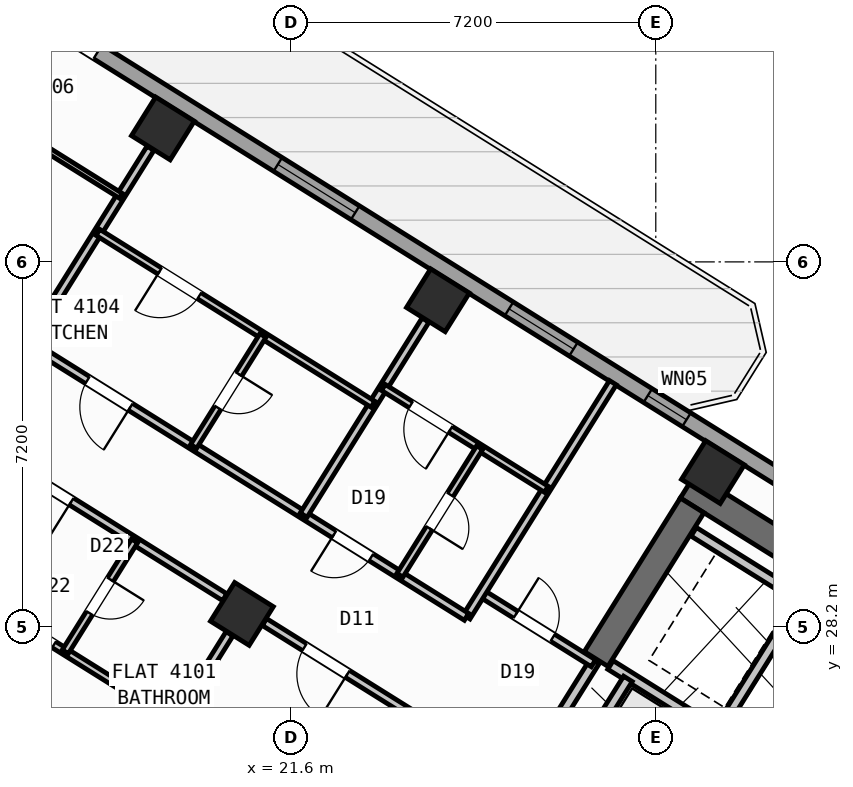
"""IFC4 building model, lengths in metres.
Left out: names, types, materials, properties, quantities, classifications, styles, units other than length and angle.
Written with IfcOpenShell. Run it as: python <this file> out.ifc"""

import sys

from ifc_helpers import new_model, si_unit, direction, frame, frame_2d, origin, origin_2d, place, context, subcontext, project, spatial, rectangle, hollow_rectangle, extrude, source, transform, mapped, element, fill, save


model = new_model("IFC4")
c1 = context("Model", 3, precision=1e-05, world=origin(), true_north=direction((0.0, 1.0)))
c2 = subcontext(c1, "Body", "Model", "MODEL_VIEW")
j1 = project(units=[si_unit("LENGTHUNIT", "METRE"), si_unit("PLANEANGLEUNIT", "RADIAN")], contexts=[c1])
p1 = place(None, origin())
s1 = spatial("IfcSite", under=j1, at=p1, CompositionType="ELEMENT")
p2 = place(p1, origin())
s2 = spatial("IfcBuilding", under=s1, at=p2, CompositionType="ELEMENT")
p3 = place(p2, frame((0.0, 0.0, 162.3)))
s3 = spatial("IfcBuildingStorey", under=s2, at=p3, CompositionType="ELEMENT", Elevation=162.3)
p4 = place(p3, frame((40.573, 24.01, 0.0), z_axis=(0.0, 0.0, 1.0), x_axis=(-0.848047359947, 0.529920442413, 0.0)))
e1 = element("IfcWall", 1, at=p4, inside=s3, PredefinedType="SHEAR", context=c2, shape_type="SweptSolid", body=[
    extrude(rectangle(XDim=13.14, YDim=0.55, at=frame_2d((6.57, 0.0))), origin(), (0.0, 0.0, 1.0), 3.35),
])
p5 = place(p3, frame((29.517, 30.594, 0.0), z_axis=(0.0, 0.0, 1.0), x_axis=(-0.529906864564, -0.848055844204, 0.0)))
e2 = element("IfcWall", 2, at=p5, inside=s3, PredefinedType="SHEAR", context=c2, shape_type="SweptSolid", body=[
    extrude(rectangle(XDim=3.575, YDim=0.55, at=frame_2d((1.788, 0.0))), origin(), (0.0, 0.0, 1.0), 3.35),
])
m1 = source(origin(), c2, "Body", "SweptSolid", [
    extrude(hollow_rectangle(XDim=0.9, YDim=0.9, WallThickness=0.036, at=origin_2d()), origin(), (0.0, 0.0, 1.0), 3.6),
])
for number, where, z_axis, x_axis in (
    (3, (29.928, 31.251, 0.0), (0.0, 0.0, 1.0), (-0.848, 0.53, 0.0)),
    (4, (24.5, 34.643, 0.0), (0.0, 0.0, 1.0), (-0.848, 0.53, 0.0)),
    (5, (20.632, 28.452, 0.0), (0.0, 0.0, 1.0), (-0.848, 0.53, 0.0)),
    (6, (19.073, 38.034, 0.0), (0.0, 0.0, 1.0), (-0.848, 0.53, 0.0)),
):
    element("IfcColumn", number, at=place(p3, frame(where, z_axis=z_axis, x_axis=x_axis)), inside=s3, PredefinedType="COLUMN", context=c2, shape_type="MappedRepresentation", body=[
        mapped(m1, transform((0.0, 0.0, 0.0), scale=1.0)),
    ])
p6 = place(p3, frame((14.138, 41.825, 0.0), z_axis=(0.0, 0.0, 1.0), x_axis=(0.848046498049, -0.529921821731, 0.0)))
e7 = element("IfcWall", 7, at=p6, inside=s3, PredefinedType="STANDARD", context=c2, shape_type="SweptSolid", body=[
    extrude(rectangle(XDim=31.588, YDim=0.32, at=frame_2d((15.794, 0.0))), origin(), (0.0, 0.0, 1.0), 3.35),
])
p7 = place(p6, frame((3.253, 0.0, 0.0)))
e8 = element("IfcOpeningElement", 8, at=p7, cuts=e7, PredefinedType="OPENING", context=c2, shape_type="SweptSolid", body=[
    extrude(rectangle(XDim=1.05, YDim=2.15, at=frame_2d((0.525, 1.075))), frame((0.0, 0.17, 0.0), z_axis=(0.0, -1.0, 0.0), x_axis=(1.0, 0.0, 0.0)), (0.0, 0.0, 1.0), 0.34),
])
p8 = place(p6, frame((0.863, 0.0, 0.85)))
e9 = element("IfcOpeningElement", 9, at=p8, cuts=e7, PredefinedType="OPENING", context=c2, shape_type="SweptSolid", body=[
    extrude(rectangle(XDim=1.8, YDim=1.5, at=frame_2d((0.9, 0.75))), frame((0.0, 0.17, 0.0), z_axis=(0.0, -1.0, 0.0), x_axis=(1.0, 0.0, 0.0)), (0.0, 0.0, 1.0), 0.34),
])
p9 = place(p6, frame((8.494, 0.0, 0.85)))
e10 = element("IfcOpeningElement", 10, at=p9, cuts=e7, PredefinedType="OPENING", context=c2, shape_type="SweptSolid", body=[
    extrude(rectangle(XDim=1.8, YDim=1.5, at=frame_2d((0.9, 0.75))), frame((0.0, 0.17, 0.0), z_axis=(0.0, -1.0, 0.0), x_axis=(1.0, 0.0, 0.0)), (0.0, 0.0, 1.0), 0.34),
])
p10 = place(p6, frame((13.874, 0.0, 0.85)))
e11 = element("IfcOpeningElement", 11, at=p10, cuts=e7, PredefinedType="OPENING", context=c2, shape_type="SweptSolid", body=[
    extrude(rectangle(XDim=1.5, YDim=1.5, at=frame_2d((0.75, 0.75))), frame((0.0, 0.17, 0.0), z_axis=(0.0, -1.0, 0.0), x_axis=(1.0, 0.0, 0.0)), (0.0, 0.0, 1.0), 0.34),
])
p11 = place(p6, frame((17.104, 0.0, 1.0)))
e12 = element("IfcOpeningElement", 12, at=p11, cuts=e7, PredefinedType="OPENING", context=c2, shape_type="SweptSolid", body=[
    extrude(rectangle(XDim=0.9, YDim=1.25, at=frame_2d((0.45, 0.625))), frame((0.0, 0.17, 0.0), z_axis=(0.0, -1.0, 0.0), x_axis=(1.0, 0.0, 0.0)), (0.0, 0.0, 1.0), 0.34),
])
p12 = place(p6, frame((22.144, 0.0, 1.0)))
e13 = element("IfcOpeningElement", 13, at=p12, cuts=e7, PredefinedType="OPENING", context=c2, shape_type="SweptSolid", body=[
    extrude(rectangle(XDim=0.9, YDim=1.25, at=frame_2d((0.45, 0.625))), frame((0.0, 0.17, 0.0), z_axis=(0.0, -1.0, 0.0), x_axis=(1.0, 0.0, 0.0)), (0.0, 0.0, 1.0), 0.34),
])
p13 = place(p6, frame((27.744, 0.0, 1.0)))
e14 = element("IfcOpeningElement", 14, at=p13, cuts=e7, PredefinedType="OPENING", context=c2, shape_type="SweptSolid", body=[
    extrude(rectangle(XDim=0.9, YDim=1.25, at=frame_2d((0.45, 0.625))), frame((0.0, 0.17, 0.0), z_axis=(0.0, -1.0, 0.0), x_axis=(1.0, 0.0, 0.0)), (0.0, 0.0, 1.0), 0.34),
])
p14 = place(p3, frame((31.822, 24.998, 0.0), z_axis=(0.0, 0.0, 1.0), x_axis=(-0.848036912365, 0.52993716162, 0.0)))
e15 = element("IfcWall", 15, at=p14, inside=s3, PredefinedType="STANDARD", context=c2, shape_type="SweptSolid", body=[
    extrude(rectangle(XDim=4.618, YDim=0.2, at=frame_2d((2.309, 0.0))), origin(), (0.0, 0.0, 1.0), 3.34),
])
p15 = place(p3, frame((28.25, 27.17, 0.0), z_axis=(0.0, 0.0, 1.0), x_axis=(-0.529905827651, -0.848056492117, 0.0)))
e16 = element("IfcWall", 16, at=p15, inside=s3, PredefinedType="STANDARD", context=c2, shape_type="SweptSolid", body=[
    extrude(rectangle(XDim=1.65, YDim=0.2, at=frame_2d((0.825, 0.0))), origin(), (0.0, 0.0, 1.0), 3.34),
])
p16 = place(p3, frame((31.645, 28.716, 0.0), z_axis=(0.0, 0.0, 1.0), x_axis=(-0.52986693015, -0.848080795876, 0.0)))
e17 = element("IfcWall", 17, at=p16, inside=s3, PredefinedType="STANDARD", context=c2, shape_type="SweptSolid", body=[
    extrude(rectangle(XDim=2.66, YDim=0.2, at=frame_2d((1.33, 0.0))), origin(), (0.0, 0.0, 1.0), 3.34),
])
p17 = place(p3, frame((33.363, 27.69, 0.0), z_axis=(0.0, 0.0, 1.0), x_axis=(-0.848047090064, 0.529920874315, 0.0)))
e18 = element("IfcWall", 18, at=p17, inside=s3, PredefinedType="STANDARD", context=c2, shape_type="SweptSolid", body=[
    extrude(rectangle(XDim=4.498, YDim=0.2, at=frame_2d((2.249, 0.0))), origin(), (0.0, 0.0, 1.0), 3.34),
])
p18 = place(p3, frame((27.596, 27.52, 0.0), z_axis=(0.0, 0.0, 1.0), x_axis=(-0.529865479138, -0.848081702443, 0.0)))
e19 = element("IfcWall", 19, at=p18, inside=s3, PredefinedType="STANDARD", context=c2, shape_type="SweptSolid", body=[
    extrude(rectangle(XDim=2.96, YDim=0.2, at=frame_2d((1.48, 0.0))), origin(), (0.0, 0.0, 1.0), 3.34),
])
p19 = place(p18, frame((1.76, 0.0, 0.0)))
e20 = element("IfcOpeningElement", 20, at=p19, cuts=e19, PredefinedType="OPENING", context=c2, shape_type="SweptSolid", body=[
    extrude(rectangle(XDim=0.86, YDim=2.05, at=frame_2d((0.43, 1.025))), frame((0.0, 0.11, 0.0), z_axis=(0.0, -1.0, 0.0), x_axis=(1.0, 0.0, 0.0)), (0.0, 0.0, 1.0), 0.22),
])
p20 = place(p3, frame((27.57, 27.478, 0.0), z_axis=(0.0, 0.0, 1.0), x_axis=(-0.848050851465, 0.529914854792, 0.0)))
e21 = element("IfcWall", 21, at=p20, inside=s3, PredefinedType="PARTITIONING", context=c2, shape_type="SweptSolid", body=[
    extrude(rectangle(XDim=2.61, YDim=0.16, at=frame_2d((1.305, 0.0))), origin(), (0.0, 0.0, 1.0), 3.34),
])
p21 = place(p20, frame((0.95, 0.0, 0.0)))
e22 = element("IfcOpeningElement", 22, at=p21, cuts=e21, PredefinedType="OPENING", context=c2, shape_type="SweptSolid", body=[
    extrude(rectangle(XDim=0.86, YDim=2.05, at=frame_2d((0.43, 1.025))), frame((0.0, 0.09, 0.0), z_axis=(0.0, -1.0, 0.0), x_axis=(1.0, 0.0, 0.0)), (0.0, 0.0, 1.0), 0.18),
])
p22 = place(p3, frame((27.953, 33.016, 0.0), z_axis=(0.0, 0.0, 1.0), x_axis=(-0.529906322364, -0.848056182997, 0.0)))
e23 = element("IfcWall", 23, at=p22, inside=s3, PredefinedType="PARTITIONING", context=c2, shape_type="SweptSolid", body=[
    extrude(rectangle(XDim=5.45, YDim=0.16, at=frame_2d((2.725, 0.0))), origin(), (0.0, 0.0, 1.0), 3.34),
])
p23 = place(p3, frame((25.065, 28.394, 0.0), z_axis=(0.0, 0.0, 1.0), x_axis=(-0.848048310262, 0.529918921593, 0.0)))
e24 = element("IfcWall", 24, at=p23, inside=s3, PredefinedType="PARTITIONING", context=c2, shape_type="SweptSolid", body=[
    extrude(rectangle(XDim=16.73, YDim=0.16, at=frame_2d((8.365, 0.0))), origin(), (0.0, 0.0, 1.0), 3.34),
])
p24 = place(p23, frame((2.22, 0.0, 0.0)))
e25 = element("IfcOpeningElement", 25, at=p24, cuts=e24, PredefinedType="OPENING", context=c2, shape_type="SweptSolid", body=[
    extrude(rectangle(XDim=0.86, YDim=2.05, at=frame_2d((0.43, 1.025))), frame((0.0, 0.09, 0.0), z_axis=(0.0, -1.0, 0.0), x_axis=(1.0, 0.0, 0.0)), (0.0, 0.0, 1.0), 0.18),
])
p25 = place(p23, frame((7.82, 0.0, 0.0)))
e26 = element("IfcOpeningElement", 26, at=p25, cuts=e24, PredefinedType="OPENING", context=c2, shape_type="SweptSolid", body=[
    extrude(rectangle(XDim=1.0, YDim=2.1, at=frame_2d((0.5, 1.05))), frame((0.0, 0.09, 0.0), z_axis=(0.0, -1.0, 0.0), x_axis=(1.0, 0.0, 0.0)), (0.0, 0.0, 1.0), 0.18),
])
p26 = place(p23, frame((12.95, 0.0, 0.0)))
e27 = element("IfcOpeningElement", 27, at=p26, cuts=e24, PredefinedType="OPENING", context=c2, shape_type="SweptSolid", body=[
    extrude(rectangle(XDim=1.0, YDim=2.1, at=frame_2d((0.5, 1.05))), frame((0.0, 0.09, 0.0), z_axis=(0.0, -1.0, 0.0), x_axis=(1.0, 0.0, 0.0)), (0.0, 0.0, 1.0), 0.18),
])
p27 = place(p3, frame((23.899, 26.529, 0.0), z_axis=(0.0, 0.0, 1.0), x_axis=(-0.848064240775, 0.529893426567, 0.0)))
e28 = element("IfcWall", 28, at=p27, inside=s3, PredefinedType="PARTITIONING", context=c2, shape_type="SweptSolid", body=[
    extrude(rectangle(XDim=3.328, YDim=0.16, at=frame_2d((1.664, 0.0))), origin(), (0.0, 0.0, 1.0), 2.775),
])
p28 = place(p27, frame((1.395, 0.0, 0.0)))
e29 = element("IfcOpeningElement", 29, at=p28, cuts=e28, PredefinedType="OPENING", context=c2, shape_type="SweptSolid", body=[
    extrude(rectangle(XDim=1.0, YDim=2.1, at=frame_2d((0.5, 1.05))), frame((0.0, 0.09, 0.0), z_axis=(0.0, -1.0, 0.0), x_axis=(1.0, 0.0, 0.0)), (0.0, 0.0, 1.0), 0.18),
])
p29 = place(p3, frame((20.293, 28.782, 0.0), z_axis=(0.0, 0.0, 1.0), x_axis=(-0.848040881926, 0.529930809241, 0.0)))
e30 = element("IfcWall", 30, at=p29, inside=s3, PredefinedType="PARTITIONING", context=c2, shape_type="SweptSolid", body=[
    extrude(rectangle(XDim=5.476, YDim=0.16, at=frame_2d((2.738, 0.0))), origin(), (0.0, 0.0, 1.0), 2.775),
])
p30 = place(p29, frame((3.568, 0.0, 0.0)))
e31 = element("IfcOpeningElement", 31, at=p30, cuts=e30, PredefinedType="OPENING", context=c2, shape_type="SweptSolid", body=[
    extrude(rectangle(XDim=1.0, YDim=2.1, at=frame_2d((0.5, 1.05))), frame((0.0, 0.09, 0.0), z_axis=(0.0, -1.0, 0.0), x_axis=(1.0, 0.0, 0.0)), (0.0, 0.0, 1.0), 0.18),
])
p31 = place(p3, frame((20.387, 28.06, 0.0), z_axis=(0.0, 0.0, 1.0), x_axis=(-0.529902564924, -0.848058530814, 0.0)))
e32 = element("IfcWall", 32, at=p31, inside=s3, PredefinedType="PARTITIONING", context=c2, shape_type="SweptSolid", body=[
    extrude(rectangle(XDim=6.376, YDim=0.16, at=frame_2d((3.188, 0.0))), origin(), (0.0, 0.0, 1.0), 2.775),
])
p32 = place(p3, frame((19.318, 26.349, 0.0), z_axis=(0.0, 0.0, 1.0), x_axis=(-0.848039019877, 0.529933789039, 0.0)))
e33 = element("IfcWall", 33, at=p32, inside=s3, PredefinedType="PLUMBINGWALL", context=c2, shape_type="SweptSolid", body=[
    extrude(rectangle(XDim=6.4, YDim=0.14, at=frame_2d((3.2, 0.0))), origin(), (0.0, 0.0, 1.0), 3.34),
])
p33 = place(p32, frame((2.824, 0.0, 0.0)))
e34 = element("IfcOpeningElement", 34, at=p33, cuts=e33, PredefinedType="OPENING", context=c2, shape_type="SweptSolid", body=[
    extrude(rectangle(XDim=0.78, YDim=2.05, at=frame_2d((0.39, 1.025))), frame((0.0, 0.08, 0.0), z_axis=(0.0, -1.0, 0.0), x_axis=(1.0, 0.0, 0.0)), (0.0, 0.0, 1.0), 0.16),
])
p34 = place(p3, frame((18.514, 29.894, 0.0), z_axis=(0.0, 0.0, 1.0), x_axis=(-0.529913878929, -0.848051461244, 0.0)))
e35 = element("IfcWall", 35, at=p34, inside=s3, PredefinedType="PLUMBINGWALL", context=c2, shape_type="SweptSolid", body=[
    extrude(rectangle(XDim=2.58, YDim=0.14, at=frame_2d((1.29, 0.0))), origin(), (0.0, 0.0, 1.0), 3.34),
])
p35 = place(p34, frame((0.9, 0.0, 0.0)))
e36 = element("IfcOpeningElement", 36, at=p35, cuts=e35, PredefinedType="OPENING", context=c2, shape_type="SweptSolid", body=[
    extrude(rectangle(XDim=0.78, YDim=2.05, at=frame_2d((0.39, 1.025))), frame((0.0, 0.08, 0.0), z_axis=(0.0, -1.0, 0.0), x_axis=(1.0, 0.0, 0.0)), (0.0, 0.0, 1.0), 0.16),
])
p36 = place(p3, frame((24.256, 34.251, 0.0), z_axis=(0.0, 0.0, 1.0), x_axis=(-0.529926399231, -0.848043637673, 0.0)))
e37 = element("IfcWall", 37, at=p36, inside=s3, PredefinedType="PARTITIONING", context=c2, shape_type="SweptSolid", body=[
    extrude(rectangle(XDim=4.538, YDim=0.16, at=frame_2d((2.269, 0.0))), origin(), (0.0, 0.0, 1.0), 2.775),
])
p37 = place(p3, frame((26.639, 30.913, 0.0), z_axis=(0.0, 0.0, 1.0), x_axis=(-0.84803087207, 0.529946827537, 0.0)))
e38 = element("IfcWall", 38, at=p37, inside=s3, PredefinedType="PLUMBINGWALL", context=c2, shape_type="SweptSolid", body=[
    extrude(rectangle(XDim=3.79, YDim=0.14, at=frame_2d((1.895, 0.0))), origin(), (0.0, 0.0, 1.0), 3.34),
])
p38 = place(p37, frame((2.23, 0.0, 0.0)))
e39 = element("IfcOpeningElement", 39, at=p38, cuts=e38, PredefinedType="OPENING", context=c2, shape_type="SweptSolid", body=[
    extrude(rectangle(XDim=0.92, YDim=2.08, at=frame_2d((0.46, 1.04))), frame((0.0, 0.08, 0.0), z_axis=(0.0, -1.0, 0.0), x_axis=(1.0, 0.0, 0.0)), (0.0, 0.0, 1.0), 0.16),
])
p39 = place(p3, frame((25.324, 31.734, 0.0), z_axis=(0.0, 0.0, 1.0), x_axis=(-0.529873322326, -0.848076802116, 0.0)))
e40 = element("IfcWall", 40, at=p39, inside=s3, PredefinedType="PLUMBINGWALL", context=c2, shape_type="SweptSolid", body=[
    extrude(rectangle(XDim=2.97, YDim=0.14, at=frame_2d((1.485, 0.0))), origin(), (0.0, 0.0, 1.0), 2.995),
])
p40 = place(p39, frame((1.095, 0.0, 0.0)))
e41 = element("IfcOpeningElement", 41, at=p40, cuts=e40, PredefinedType="OPENING", context=c2, shape_type="SweptSolid", body=[
    extrude(rectangle(XDim=0.78, YDim=2.05, at=frame_2d((0.39, 1.025))), frame((0.0, 0.08, 0.0), z_axis=(0.0, -1.0, 0.0), x_axis=(1.0, 0.0, 0.0)), (0.0, 0.0, 1.0), 0.16),
])
p41 = place(p3, frame((18.828, 37.643, 0.0), z_axis=(0.0, 0.0, 1.0), x_axis=(-0.529926399231, -0.848043637673, 0.0)))
e42 = element("IfcWall", 42, at=p41, inside=s3, PredefinedType="PARTITIONING", context=c2, shape_type="SweptSolid", body=[
    extrude(rectangle(XDim=4.538, YDim=0.16, at=frame_2d((2.269, 0.0))), origin(), (0.0, 0.0, 1.0), 2.775),
])
p42 = place(p3, frame((23.218, 32.591, 0.0), z_axis=(0.0, 0.0, 1.0), x_axis=(-0.848056163074, 0.529906354247, 0.0)))
e43 = element("IfcWall", 43, at=p42, inside=s3, PredefinedType="PLUMBINGWALL", context=c2, shape_type="SweptSolid", body=[
    extrude(rectangle(XDim=6.4, YDim=0.14, at=frame_2d((3.2, 0.0))), origin(), (0.0, 0.0, 1.0), 3.34),
])
p43 = place(p42, frame((4.04, 0.0, 0.0)))
e44 = element("IfcOpeningElement", 44, at=p43, cuts=e43, PredefinedType="OPENING", context=c2, shape_type="SweptSolid", body=[
    extrude(rectangle(XDim=0.92, YDim=2.08, at=frame_2d((0.46, 1.04))), frame((0.0, 0.08, 0.0), z_axis=(0.0, -1.0, 0.0), x_axis=(1.0, 0.0, 0.0)), (0.0, 0.0, 1.0), 0.16),
])
p44 = place(p3, frame((21.047, 33.947, 0.0), z_axis=(0.0, 0.0, 1.0), x_axis=(-0.529913878929, -0.848051461244, 0.0)))
e45 = element("IfcWall", 45, at=p44, inside=s3, PredefinedType="PLUMBINGWALL", context=c2, shape_type="SweptSolid", body=[
    extrude(rectangle(XDim=2.58, YDim=0.14, at=frame_2d((1.29, 0.0))), origin(), (0.0, 0.0, 1.0), 3.34),
])
p45 = place(p44, frame((0.9, 0.0, 0.0)))
e46 = element("IfcOpeningElement", 46, at=p45, cuts=e45, PredefinedType="OPENING", context=c2, shape_type="SweptSolid", body=[
    extrude(rectangle(XDim=0.78, YDim=2.05, at=frame_2d((0.39, 1.025))), frame((0.0, 0.08, 0.0), z_axis=(0.0, -1.0, 0.0), x_axis=(1.0, 0.0, 0.0)), (0.0, 0.0, 1.0), 0.16),
])
p46 = place(p3, frame((18.242, 36.705, 0.0), z_axis=(0.0, 0.0, 1.0), x_axis=(-0.848048787466, 0.529918157905, 0.0)))
e47 = element("IfcWall", 47, at=p46, inside=s3, PredefinedType="PARTITIONING", context=c2, shape_type="SweptSolid", body=[
    extrude(rectangle(XDim=6.52, YDim=0.11, at=frame_2d((3.26, 0.0))), origin(), (0.0, 0.0, 1.0), 3.34),
])
p47 = place(p46, frame((2.8, 0.0, 0.0)))
e48 = element("IfcOpeningElement", 48, at=p47, cuts=e47, PredefinedType="OPENING", context=c2, shape_type="SweptSolid", body=[
    extrude(rectangle(XDim=0.92, YDim=2.08, at=frame_2d((0.46, 1.04))), frame((0.0, 0.065, 0.0), z_axis=(0.0, -1.0, 0.0), x_axis=(1.0, 0.0, 0.0)), (0.0, 0.0, 1.0), 0.13),
])
m2 = source(origin(), c2, "Body", "SweptSolid", [
    extrude(rectangle(XDim=1.05, YDim=2.15, at=frame_2d((0.525, 1.075))), frame((0.0, 0.025, 0.0), z_axis=(0.0, -1.0, 0.0), x_axis=(1.0, 0.0, 0.0)), (0.0, 0.0, 1.0), 0.05),
])
p48 = place(p7, origin())
e49 = element("IfcDoor", 49, at=p48, inside=s3, OperationType="SINGLE_SWING_RIGHT", PredefinedType="DOOR", context=c2, shape_type="MappedRepresentation", body=[
    mapped(m2, transform((0.0, 0.0, 0.0), scale=1.0)),
])
fill(e8, e49)
m3 = source(origin(), c2, "Body", "SweptSolid", [
    extrude(rectangle(XDim=1.8, YDim=1.5, at=frame_2d((0.9, 0.75))), frame((0.0, 0.03, 0.0), z_axis=(0.0, -1.0, 0.0), x_axis=(1.0, 0.0, 0.0)), (0.0, 0.0, 1.0), 0.06),
])
p49 = place(p9, origin())
e50 = element("IfcWindow", 50, at=p49, inside=s3, PartitioningType="SINGLE_PANEL", PredefinedType="WINDOW", context=c2, shape_type="MappedRepresentation", body=[
    mapped(m3, transform((0.0, 0.0, 0.0), scale=1.0)),
])
fill(e10, e50)
m4 = source(origin(), c2, "Body", "SweptSolid", [
    extrude(rectangle(XDim=1.5, YDim=1.5, at=frame_2d((0.75, 0.75))), frame((0.0, 0.03, 0.0), z_axis=(0.0, -1.0, 0.0), x_axis=(1.0, 0.0, 0.0)), (0.0, 0.0, 1.0), 0.06),
])
p50 = place(p10, origin())
e51 = element("IfcWindow", 51, at=p50, inside=s3, PartitioningType="SINGLE_PANEL", PredefinedType="WINDOW", context=c2, shape_type="MappedRepresentation", body=[
    mapped(m4, transform((0.0, 0.0, 0.0), scale=1.0)),
])
fill(e11, e51)
m5 = source(origin(), c2, "Body", "SweptSolid", [
    extrude(rectangle(XDim=0.9, YDim=1.25, at=frame_2d((0.45, 0.625))), frame((0.0, 0.03, 0.0), z_axis=(0.0, -1.0, 0.0), x_axis=(1.0, 0.0, 0.0)), (0.0, 0.0, 1.0), 0.06),
])
p51 = place(p11, origin())
e52 = element("IfcWindow", 52, at=p51, inside=s3, PartitioningType="SINGLE_PANEL", PredefinedType="WINDOW", context=c2, shape_type="MappedRepresentation", body=[
    mapped(m5, transform((0.0, 0.0, 0.0), scale=1.0)),
])
fill(e12, e52)
m6 = source(origin(), c2, "Body", "SweptSolid", [
    extrude(rectangle(XDim=0.86, YDim=2.05, at=frame_2d((0.43, 1.025))), frame((0.0, 0.025, 0.0), z_axis=(0.0, -1.0, 0.0), x_axis=(1.0, 0.0, 0.0)), (0.0, 0.0, 1.0), 0.05),
])
p52 = place(p21, frame((0.86, 0.0, 0.0), z_axis=(0.0, 0.0, 1.0), x_axis=(-1.0, 0.0, 0.0)))
e53 = element("IfcDoor", 53, at=p52, inside=s3, OperationType="SINGLE_SWING_LEFT", PredefinedType="DOOR", context=c2, shape_type="MappedRepresentation", body=[
    mapped(m6, transform((0.0, 0.0, 0.0), scale=1.0)),
])
fill(e22, e53)
m7 = source(origin(), c2, "Body", "SweptSolid", [
    extrude(rectangle(XDim=1.0, YDim=2.1, at=frame_2d((0.5, 1.05))), frame((0.0, 0.025, 0.0), z_axis=(0.0, -1.0, 0.0), x_axis=(1.0, 0.0, 0.0)), (0.0, 0.0, 1.0), 0.05),
])
p53 = place(p28, origin())
e54 = element("IfcDoor", 54, at=p53, inside=s3, OperationType="SINGLE_SWING_LEFT", PredefinedType="DOOR", context=c2, shape_type="MappedRepresentation", body=[
    mapped(m7, transform((0.0, 0.0, 0.0), scale=1.0)),
])
fill(e29, e54)
p54 = place(p30, origin())
e55 = element("IfcDoor", 55, at=p54, inside=s3, OperationType="SINGLE_SWING_LEFT", PredefinedType="DOOR", context=c2, shape_type="MappedRepresentation", body=[
    mapped(m7, transform((0.0, 0.0, 0.0), scale=1.0)),
])
fill(e31, e55)
m8 = source(origin(), c2, "Body", "SweptSolid", [
    extrude(rectangle(XDim=0.78, YDim=2.05, at=frame_2d((0.39, 1.025))), frame((0.0, 0.025, 0.0), z_axis=(0.0, -1.0, 0.0), x_axis=(1.0, 0.0, 0.0)), (0.0, 0.0, 1.0), 0.05),
])
p55 = place(p33, origin())
e56 = element("IfcDoor", 56, at=p55, inside=s3, OperationType="SINGLE_SWING_RIGHT", PredefinedType="DOOR", context=c2, shape_type="MappedRepresentation", body=[
    mapped(m8, transform((0.0, 0.0, 0.0), scale=1.0)),
])
fill(e34, e56)
p56 = place(p35, origin())
e57 = element("IfcDoor", 57, at=p56, inside=s3, OperationType="SINGLE_SWING_LEFT", PredefinedType="DOOR", context=c2, shape_type="MappedRepresentation", body=[
    mapped(m8, transform((0.0, 0.0, 0.0), scale=1.0)),
])
fill(e36, e57)
p57 = place(p24, origin())
e58 = element("IfcDoor", 58, at=p57, inside=s3, OperationType="SINGLE_SWING_RIGHT", PredefinedType="DOOR", context=c2, shape_type="MappedRepresentation", body=[
    mapped(m6, transform((0.0, 0.0, 0.0), scale=1.0)),
])
fill(e25, e58)
m9 = source(origin(), c2, "Body", "SweptSolid", [
    extrude(rectangle(XDim=0.92, YDim=2.08, at=frame_2d((0.46, 1.04))), frame((0.0, 0.025, 0.0), z_axis=(0.0, -1.0, 0.0), x_axis=(1.0, 0.0, 0.0)), (0.0, 0.0, 1.0), 0.05),
])
p58 = place(p38, origin())
e59 = element("IfcDoor", 59, at=p58, inside=s3, OperationType="SINGLE_SWING_LEFT", PredefinedType="DOOR", context=c2, shape_type="MappedRepresentation", body=[
    mapped(m9, transform((0.0, 0.0, 0.0), scale=1.0)),
])
fill(e39, e59)
p59 = place(p40, origin())
e60 = element("IfcDoor", 60, at=p59, inside=s3, OperationType="SINGLE_SWING_RIGHT", PredefinedType="DOOR", context=c2, shape_type="MappedRepresentation", body=[
    mapped(m8, transform((0.0, 0.0, 0.0), scale=1.0)),
])
fill(e41, e60)
p60 = place(p25, origin())
e61 = element("IfcDoor", 61, at=p60, inside=s3, OperationType="SINGLE_SWING_LEFT", PredefinedType="DOOR", context=c2, shape_type="MappedRepresentation", body=[
    mapped(m7, transform((0.0, 0.0, 0.0), scale=1.0)),
])
fill(e26, e61)
p61 = place(p43, origin())
e62 = element("IfcDoor", 62, at=p61, inside=s3, OperationType="SINGLE_SWING_RIGHT", PredefinedType="DOOR", context=c2, shape_type="MappedRepresentation", body=[
    mapped(m9, transform((0.0, 0.0, 0.0), scale=1.0)),
])
fill(e44, e62)
p62 = place(p45, origin())
e63 = element("IfcDoor", 63, at=p62, inside=s3, OperationType="SINGLE_SWING_LEFT", PredefinedType="DOOR", context=c2, shape_type="MappedRepresentation", body=[
    mapped(m8, transform((0.0, 0.0, 0.0), scale=1.0)),
])
fill(e46, e63)
save(model, sys.argv[1])
